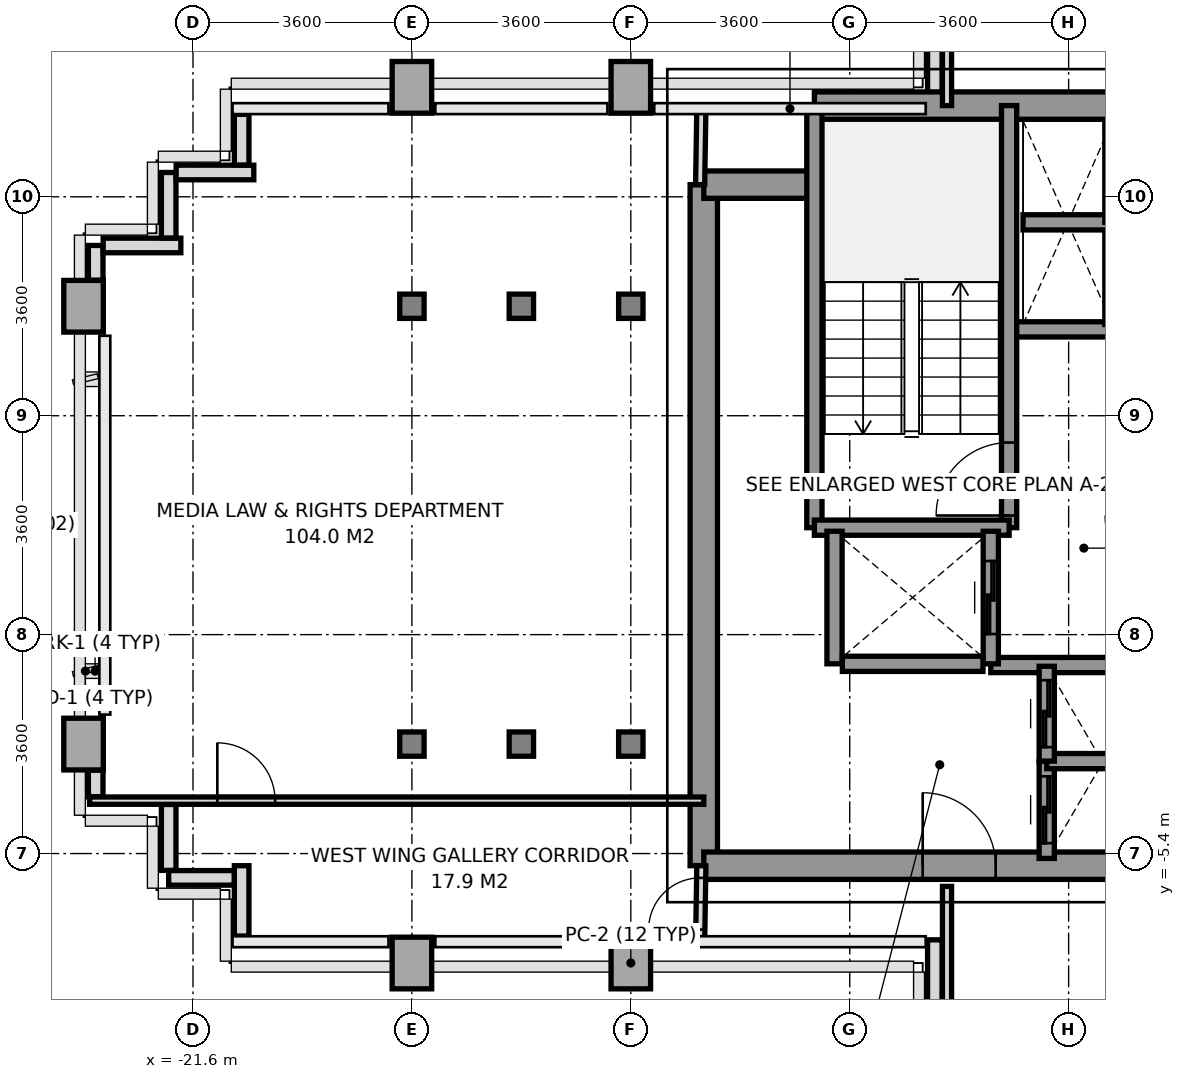
"""IFC4 building model, lengths in metres.
Left out: names, types, materials, properties, quantities, classifications, styles, units other than length and angle.
Written with IfcOpenShell. Run it as: python <this file> out.ifc"""

import sys

from ifc_helpers import new_model, si_unit, direction, frame, frame_2d, origin, origin_2d, place, context, subcontext, project, spatial, rectangle, i_section, extrude, source, transform, mapped, element, fill, save


model = new_model("IFC4")
c1 = context("Model", 3, precision=1e-05, world=origin(), true_north=direction((0.0, 1.0)))
c2 = subcontext(c1, "Body", "Model", "MODEL_VIEW")
j1 = project(units=[si_unit("LENGTHUNIT", "METRE"), si_unit("PLANEANGLEUNIT", "RADIAN")], contexts=[c1])
p1 = place(None, origin())
s1 = spatial("IfcSite", under=j1, at=p1, CompositionType="ELEMENT")
p2 = place(p1, origin())
s2 = spatial("IfcBuilding", under=s1, at=p2, CompositionType="ELEMENT")
p3 = place(p2, frame((0.0, 0.0, 134.6)))
s3 = spatial("IfcBuildingStorey", under=s2, at=p3, CompositionType="ELEMENT", Elevation=134.6)
m1 = source(origin(), c2, "Body", "SweptSolid", [
    extrude(rectangle(XDim=0.65, YDim=0.85, at=origin_2d()), origin(), (0.0, 0.0, 1.0), 3.2),
])
for number, where, z_axis, x_axis in (
    (1, (-23.4, -3.6, 0.0), (0.0, 0.0, 1.0), (1.0, 0.0, 0.0)),
    (2, (-23.4, 3.6, 0.0), (0.0, 0.0, 1.0), (1.0, 0.0, 0.0)),
    (3, (-18.0, -7.2, 0.0), (0.0, 0.0, 1.0), (1.0, 0.0, 0.0)),
):
    element("IfcColumn", number, at=place(p3, frame(where, z_axis=z_axis, x_axis=x_axis)), inside=s3, PredefinedType="COLUMN", context=c2, shape_type="MappedRepresentation", body=[
        mapped(m1, transform((0.0, 0.0, 0.0), x_axis=(1.0, 0.0, 0.0), y_axis=(0.0, 1.0, 0.0), z_axis=(0.0, 0.0, 1.0), scale=1.0)),
    ])
m2 = source(origin(), c2, "Body", "SweptSolid", [
    extrude(i_section(OverallWidth=0.401, OverallDepth=0.399, WebThickness=0.02, FlangeThickness=0.032, at=origin_2d()), origin(), (0.0, 0.0, 1.0), 3.2),
])
for number, where, z_axis, x_axis in (
    (4, (-18.0, -3.6, 0.0), (0.0, 0.0, 1.0), (1.0, 0.0, 0.0)),
    (5, (-18.0, 3.6, 0.0), (0.0, 0.0, 1.0), (1.0, 0.0, 0.0)),
):
    element("IfcColumn", number, at=place(p3, frame(where, z_axis=z_axis, x_axis=x_axis)), inside=s3, PredefinedType="COLUMN", context=c2, shape_type="MappedRepresentation", body=[
        mapped(m2, transform((0.0, 0.0, 0.0), x_axis=(1.0, 0.0, 0.0), y_axis=(0.0, 1.0, 0.0), z_axis=(0.0, 0.0, 1.0), scale=1.0)),
    ])
p4 = place(p3, frame((-18.0, 7.2, 0.0), z_axis=(0.0, 0.0, 1.0), x_axis=(1.0, 0.0, 0.0)))
e6 = element("IfcColumn", 6, at=p4, inside=s3, PredefinedType="COLUMN", context=c2, shape_type="MappedRepresentation", body=[
    mapped(m1, transform((0.0, 0.0, 0.0), x_axis=(1.0, 0.0, 0.0), y_axis=(0.0, 1.0, 0.0), z_axis=(0.0, 0.0, 1.0), scale=1.0)),
])
for number, where, z_axis, x_axis in (
    (7, (-16.2, -3.6, 0.0), (0.0, 0.0, 1.0), (1.0, 0.0, 0.0)),
    (8, (-16.2, 3.6, 0.0), (0.0, 0.0, 1.0), (1.0, 0.0, 0.0)),
):
    element("IfcColumn", number, at=place(p3, frame(where, z_axis=z_axis, x_axis=x_axis)), inside=s3, PredefinedType="COLUMN", context=c2, shape_type="MappedRepresentation", body=[
        mapped(m2, transform((0.0, 0.0, 0.0), x_axis=(1.0, 0.0, 0.0), y_axis=(0.0, 1.0, 0.0), z_axis=(0.0, 0.0, 1.0), scale=1.0)),
    ])
p5 = place(p3, frame((-14.4, -7.2, 0.0), z_axis=(0.0, 0.0, 1.0), x_axis=(1.0, 0.0, 0.0)))
e9 = element("IfcColumn", 9, at=p5, inside=s3, PredefinedType="COLUMN", context=c2, shape_type="MappedRepresentation", body=[
    mapped(m1, transform((0.0, 0.0, 0.0), x_axis=(1.0, 0.0, 0.0), y_axis=(0.0, 1.0, 0.0), z_axis=(0.0, 0.0, 1.0), scale=1.0)),
])
for number, where, z_axis, x_axis in (
    (10, (-14.4, -3.6, 0.0), (0.0, 0.0, 1.0), (1.0, 0.0, 0.0)),
    (11, (-14.4, 3.6, 0.0), (0.0, 0.0, 1.0), (1.0, 0.0, 0.0)),
):
    element("IfcColumn", number, at=place(p3, frame(where, z_axis=z_axis, x_axis=x_axis)), inside=s3, PredefinedType="COLUMN", context=c2, shape_type="MappedRepresentation", body=[
        mapped(m2, transform((0.0, 0.0, 0.0), x_axis=(1.0, 0.0, 0.0), y_axis=(0.0, 1.0, 0.0), z_axis=(0.0, 0.0, 1.0), scale=1.0)),
    ])
p6 = place(p3, frame((-14.4, 7.2, 0.0), z_axis=(0.0, 0.0, 1.0), x_axis=(1.0, 0.0, 0.0)))
e12 = element("IfcColumn", 12, at=p6, inside=s3, PredefinedType="COLUMN", context=c2, shape_type="MappedRepresentation", body=[
    mapped(m1, transform((0.0, 0.0, 0.0), x_axis=(1.0, 0.0, 0.0), y_axis=(0.0, 1.0, 0.0), z_axis=(0.0, 0.0, 1.0), scale=1.0)),
])
p7 = place(p3, frame((-9.4, -8.472, 0.0), z_axis=(0.0, 0.0, 1.0), x_axis=(0.0, 1.0, 0.0)))
e13 = element("IfcWall", 13, at=p7, inside=s3, PredefinedType="PARAPET", context=c2, shape_type="SweptSolid", body=[
    extrude(rectangle(XDim=1.653, YDim=0.24, at=frame_2d((0.827, 0.0))), origin(), (0.0, 0.0, 1.0), 1.15),
])
p8 = place(p3, frame((-20.8, -6.757, 0.0), z_axis=(0.0, 0.0, 1.0), x_axis=(0.0, 1.0, 0.0)))
e14 = element("IfcWall", 14, at=p8, inside=s3, PredefinedType="PARAPET", context=c2, shape_type="SweptSolid", body=[
    extrude(rectangle(XDim=1.157, YDim=0.24, at=frame_2d((0.579, 0.0))), origin(), (0.0, 0.0, 1.0), 1.15),
])
p9 = place(p3, frame((-20.923, -5.8, 0.0), z_axis=(0.0, 0.0, 1.0), x_axis=(-1.0, 0.0, 0.0)))
e15 = element("IfcWall", 15, at=p9, inside=s3, PredefinedType="PARAPET", context=c2, shape_type="SweptSolid", body=[
    extrude(rectangle(XDim=1.077, YDim=0.24, at=frame_2d((0.539, 0.0))), origin(), (0.0, 0.0, 1.0), 1.15),
])
p10 = place(p3, frame((-22.0, -5.677, 0.0), z_axis=(0.0, 0.0, 1.0), x_axis=(0.0, 1.0, 0.0)))
e16 = element("IfcWall", 16, at=p10, inside=s3, PredefinedType="PARAPET", context=c2, shape_type="SweptSolid", body=[
    extrude(rectangle(XDim=1.084, YDim=0.24, at=frame_2d((0.542, 0.0))), origin(), (0.0, 0.0, 1.0), 1.15),
])
p11 = place(p3, frame((-23.2, -4.467, 0.0), z_axis=(0.0, 0.0, 1.0), x_axis=(0.0, 1.0, 0.0)))
e17 = element("IfcWall", 17, at=p11, inside=s3, PredefinedType="PARAPET", context=c2, shape_type="SweptSolid", body=[
    extrude(rectangle(XDim=0.439, YDim=0.24, at=frame_2d((0.219, 0.0))), origin(), (0.0, 0.0, 1.0), 1.15),
])
p12 = place(p3, frame((-23.2, 4.028, 0.0), z_axis=(0.0, 0.0, 1.0), x_axis=(0.0, 1.0, 0.0)))
e18 = element("IfcWall", 18, at=p12, inside=s3, PredefinedType="PARAPET", context=c2, shape_type="SweptSolid", body=[
    extrude(rectangle(XDim=0.572, YDim=0.24, at=frame_2d((0.286, 0.0))), origin(), (0.0, 0.0, 1.0), 1.15),
])
p13 = place(p3, frame((-23.077, 4.6, 0.0), z_axis=(0.0, 0.0, 1.0), x_axis=(1.0, 0.0, 0.0)))
e19 = element("IfcWall", 19, at=p13, inside=s3, PredefinedType="PARAPET", context=c2, shape_type="SweptSolid", body=[
    extrude(rectangle(XDim=1.277, YDim=0.24, at=frame_2d((0.638, 0.0))), origin(), (0.0, 0.0, 1.0), 1.15),
])
p14 = place(p3, frame((-22.0, 4.723, 0.0), z_axis=(0.0, 0.0, 1.0), x_axis=(0.0, 1.0, 0.0)))
e20 = element("IfcWall", 20, at=p14, inside=s3, PredefinedType="PARAPET", context=c2, shape_type="SweptSolid", body=[
    extrude(rectangle(XDim=1.077, YDim=0.24, at=frame_2d((0.539, 0.0))), origin(), (0.0, 0.0, 1.0), 1.15),
])
p15 = place(p3, frame((-21.877, 5.8, 0.0), z_axis=(0.0, 0.0, 1.0), x_axis=(1.0, 0.0, 0.0)))
e21 = element("IfcWall", 21, at=p15, inside=s3, PredefinedType="PARAPET", context=c2, shape_type="SweptSolid", body=[
    extrude(rectangle(XDim=1.277, YDim=0.24, at=frame_2d((0.638, 0.0))), origin(), (0.0, 0.0, 1.0), 1.15),
])
p16 = place(p3, frame((-20.8, 5.923, 0.0), z_axis=(0.0, 0.0, 1.0), x_axis=(0.0, 1.0, 0.0)))
e22 = element("IfcWall", 22, at=p16, inside=s3, PredefinedType="PARAPET", context=c2, shape_type="SweptSolid", body=[
    extrude(rectangle(XDim=0.834, YDim=0.24, at=frame_2d((0.417, 0.0))), origin(), (0.0, 0.0, 1.0), 1.15),
])
p17 = place(p3, frame((-9.4, 6.953, 0.0), z_axis=(0.0, 0.0, 1.0), x_axis=(0.0, 1.0, 0.0)))
e23 = element("IfcWall", 23, at=p17, inside=s3, PredefinedType="PARAPET", context=c2, shape_type="SweptSolid", body=[
    extrude(rectangle(XDim=1.519, YDim=0.24, at=frame_2d((0.76, 0.0))), origin(), (0.0, 0.0, 1.0), 1.15),
])
p18 = place(p3, frame((-13.2, -5.6, 0.0), z_axis=(0.0, 0.0, 1.0), x_axis=(0.0, 1.0, 0.0)))
e24 = element("IfcWall", 24, at=p18, inside=s3, PredefinedType="SHEAR", context=c2, shape_type="SweptSolid", body=[
    extrude(rectangle(XDim=11.2, YDim=0.45, at=frame_2d((5.6, 0.0))), origin(), (0.0, 0.0, 1.0), 3.2),
])
p19 = place(p3, frame((-11.381, 6.9, 0.0), z_axis=(0.0, 0.0, 1.0), x_axis=(1.0, 0.0, 0.0)))
e25 = element("IfcWall", 25, at=p19, inside=s3, PredefinedType="SHEAR", context=c2, shape_type="SweptSolid", body=[
    extrude(rectangle(XDim=5.981, YDim=0.45, at=frame_2d((2.991, 0.0))), origin(), (0.0, 0.0, 1.0), 3.2),
])
p20 = place(p3, frame((-13.2, 5.6, 0.0), z_axis=(0.0, 0.0, 1.0), x_axis=(1.0, 0.0, 0.0)))
e26 = element("IfcWall", 26, at=p20, inside=s3, PredefinedType="SHEAR", context=c2, shape_type="SweptSolid", body=[
    extrude(rectangle(XDim=1.819, YDim=0.45, at=frame_2d((0.909, 0.0))), origin(), (0.0, 0.0, 1.0), 3.2),
])
p21 = place(p3, frame((-13.2, -5.6, 0.0), z_axis=(0.0, 0.0, 1.0), x_axis=(1.0, 0.0, 0.0)))
e27 = element("IfcWall", 27, at=p21, inside=s3, PredefinedType="SHEAR", context=c2, shape_type="SweptSolid", body=[
    extrude(rectangle(XDim=7.8, YDim=0.45, at=frame_2d((3.9, 0.0))), origin(), (0.0, 0.0, 1.0), 3.2),
])
p22 = place(p21, frame((3.6, 0.0, 0.0)))
e28 = element("IfcOpeningElement", 28, at=p22, cuts=e27, PredefinedType="OPENING", context=c2, shape_type="SweptSolid", body=[
    extrude(rectangle(XDim=1.2, YDim=2.2, at=frame_2d((0.6, 1.1))), frame((0.0, 0.235, 0.0), z_axis=(0.0, -1.0, 0.0), x_axis=(1.0, 0.0, 0.0)), (0.0, 0.0, 1.0), 0.47),
])
p23 = place(p3, frame((-8.18, 3.22, 0.0), z_axis=(0.0, 0.0, 1.0), x_axis=(1.0, 0.0, 0.0)))
e29 = element("IfcWall", 29, at=p23, inside=s3, PredefinedType="SOLIDWALL", context=c2, shape_type="SweptSolid", body=[
    extrude(rectangle(XDim=2.78, YDim=0.25, at=frame_2d((1.39, 0.0))), origin(), (0.0, 0.0, 1.0), 3.2),
])
p24 = place(p3, frame((-8.48, -2.3, 0.0), z_axis=(0.0, 0.0, 1.0), x_axis=(1.0, 0.0, 0.0)))
e30 = element("IfcWall", 30, at=p24, inside=s3, PredefinedType="SOLIDWALL", context=c2, shape_type="SweptSolid", body=[
    extrude(rectangle(XDim=3.08, YDim=0.25, at=frame_2d((1.54, 0.0))), origin(), (0.0, 0.0, 1.0), 3.2),
])
p25 = place(p3, frame((-8.179, -0.041, 0.0), z_axis=(0.0, 0.0, 1.0), x_axis=(0.0, 1.0, 0.0)))
e31 = element("IfcWall", 31, at=p25, inside=s3, PredefinedType="SOLIDWALL", context=c2, shape_type="SweptSolid", body=[
    extrude(rectangle(XDim=6.941, YDim=0.25, at=frame_2d((3.47, 0.0))), origin(), (0.0, 0.0, 1.0), 3.2),
])
p26 = place(p25, frame((0.2, 0.0, 0.0)))
e32 = element("IfcOpeningElement", 32, at=p26, cuts=e31, PredefinedType="OPENING", context=c2, shape_type="SweptSolid", body=[
    extrude(rectangle(XDim=1.2, YDim=2.2, at=frame_2d((0.6, 1.1))), frame((0.0, 0.135, 0.0), z_axis=(0.0, -1.0, 0.0), x_axis=(1.0, 0.0, 0.0)), (0.0, 0.0, 1.0), 0.27),
])
p27 = place(p3, frame((-11.381, -0.041, 0.0), z_axis=(0.0, 0.0, 1.0), x_axis=(0.0, 1.0, 0.0)))
e33 = element("IfcWall", 33, at=p27, inside=s3, PredefinedType="SOLIDWALL", context=c2, shape_type="SweptSolid", body=[
    extrude(rectangle(XDim=6.941, YDim=0.25, at=frame_2d((3.47, 0.0))), origin(), (0.0, 0.0, 1.0), 3.2),
])
p28 = place(p3, frame((-11.381, -0.041, 0.0), z_axis=(0.0, 0.0, 1.0), x_axis=(1.0, 0.0, 0.0)))
e34 = element("IfcWall", 34, at=p28, inside=s3, PredefinedType="SOLIDWALL", context=c2, shape_type="SweptSolid", body=[
    extrude(rectangle(XDim=3.202, YDim=0.25, at=frame_2d((1.601, 0.0))), origin(), (0.0, 0.0, 1.0), 3.2),
])
p29 = place(p3, frame((-11.05, -2.28, 0.0), z_axis=(0.0, 0.0, 1.0), x_axis=(0.0, 1.0, 0.0)))
e35 = element("IfcWall", 35, at=p29, inside=s3, PredefinedType="SOLIDWALL", context=c2, shape_type="SweptSolid", body=[
    extrude(rectangle(XDim=2.18, YDim=0.25, at=frame_2d((1.09, 0.0))), origin(), (0.0, 0.0, 1.0), 3.2),
])
p30 = place(p3, frame((-8.48, -2.28, 0.0), z_axis=(0.0, 0.0, 1.0), x_axis=(0.0, 1.0, 0.0)))
e36 = element("IfcWall", 36, at=p30, inside=s3, PredefinedType="SOLIDWALL", context=c2, shape_type="SweptSolid", body=[
    extrude(rectangle(XDim=2.18, YDim=0.25, at=frame_2d((1.09, 0.0))), origin(), (0.0, 0.0, 1.0), 3.2),
])
p31 = place(p30, frame((0.49, 0.0, 0.0)))
e37 = element("IfcOpeningElement", 37, at=p31, cuts=e36, PredefinedType="OPENING", context=c2, shape_type="SweptSolid", body=[
    extrude(rectangle(XDim=1.2, YDim=2.2, at=frame_2d((0.6, 1.1))), frame((0.0, 0.135, 0.0), z_axis=(0.0, -1.0, 0.0), x_axis=(1.0, 0.0, 0.0)), (0.0, 0.0, 1.0), 0.27),
])
p32 = place(p3, frame((-10.921, -2.28, 0.0), z_axis=(0.0, 0.0, 1.0), x_axis=(1.0, 0.0, 0.0)))
e38 = element("IfcWall", 38, at=p32, inside=s3, PredefinedType="SOLIDWALL", context=c2, shape_type="SweptSolid", body=[
    extrude(rectangle(XDim=2.312, YDim=0.25, at=frame_2d((1.156, 0.0))), origin(), (0.0, 0.0, 1.0), 3.2),
])
p33 = place(p3, frame((-7.56, -5.48, 0.0), z_axis=(0.0, 0.0, 1.0), x_axis=(0.0, 1.0, 0.0)))
e39 = element("IfcWall", 39, at=p33, inside=s3, PredefinedType="SOLIDWALL", context=c2, shape_type="SweptSolid", body=[
    extrude(rectangle(XDim=1.6, YDim=0.25, at=frame_2d((0.8, 0.0))), origin(), (0.0, 0.0, 1.0), 3.2),
])
p34 = place(p33, frame((0.25, 0.0, 0.0)))
e40 = element("IfcOpeningElement", 40, at=p34, cuts=e39, PredefinedType="OPENING", context=c2, shape_type="SweptSolid", body=[
    extrude(rectangle(XDim=1.1, YDim=2.2, at=frame_2d((0.55, 1.1))), frame((0.0, 0.135, 0.0), z_axis=(0.0, -1.0, 0.0), x_axis=(1.0, 0.0, 0.0)), (0.0, 0.0, 1.0), 0.27),
])
p35 = place(p3, frame((-7.56, -3.88, 0.0), z_axis=(0.0, 0.0, 1.0), x_axis=(1.0, 0.0, 0.0)))
e41 = element("IfcWall", 41, at=p35, inside=s3, PredefinedType="SOLIDWALL", context=c2, shape_type="SweptSolid", body=[
    extrude(rectangle(XDim=1.84, YDim=0.25, at=frame_2d((0.92, 0.0))), origin(), (0.0, 0.0, 1.0), 3.2),
])
p36 = place(p3, frame((-7.56, -3.88, 0.0), z_axis=(0.0, 0.0, 1.0), x_axis=(0.0, 1.0, 0.0)))
e42 = element("IfcWall", 42, at=p36, inside=s3, PredefinedType="SOLIDWALL", context=c2, shape_type="SweptSolid", body=[
    extrude(rectangle(XDim=1.56, YDim=0.25, at=frame_2d((0.78, 0.0))), origin(), (0.0, 0.0, 1.0), 3.2),
])
p37 = place(p36, frame((0.23, 0.0, 0.0)))
e43 = element("IfcOpeningElement", 43, at=p37, cuts=e42, PredefinedType="OPENING", context=c2, shape_type="SweptSolid", body=[
    extrude(rectangle(XDim=1.1, YDim=2.2, at=frame_2d((0.55, 1.1))), frame((0.0, 0.135, 0.0), z_axis=(0.0, -1.0, 0.0), x_axis=(1.0, 0.0, 0.0)), (0.0, 0.0, 1.0), 0.27),
])
p38 = place(p3, frame((-6.48, 3.3, 0.0), z_axis=(0.0, 0.0, 1.0), x_axis=(0.0, 1.0, 0.0)))
e44 = element("IfcWall", 44, at=p38, inside=s3, PredefinedType="SOLIDWALL", context=c2, shape_type="SweptSolid", body=[
    extrude(rectangle(XDim=1.68, YDim=0.25, at=frame_2d((0.84, 0.0))), origin(), (0.0, 0.0, 1.0), 3.2),
])
p39 = place(p3, frame((-7.95, 4.98, 0.0), z_axis=(0.0, 0.0, 1.0), x_axis=(1.0, 0.0, 0.0)))
e45 = element("IfcWall", 45, at=p39, inside=s3, PredefinedType="SOLIDWALL", context=c2, shape_type="SweptSolid", body=[
    extrude(rectangle(XDim=1.47, YDim=0.25, at=frame_2d((0.735, 0.0))), origin(), (0.0, 0.0, 1.0), 3.2),
])
p40 = place(p3, frame((-6.48, 4.98, 0.0), z_axis=(0.0, 0.0, 1.0), x_axis=(0.0, 1.0, 0.0)))
e46 = element("IfcWall", 46, at=p40, inside=s3, PredefinedType="SOLIDWALL", context=c2, shape_type="SweptSolid", body=[
    extrude(rectangle(XDim=1.67, YDim=0.25, at=frame_2d((0.835, 0.0))), origin(), (0.0, 0.0, 1.0), 3.2),
])
p41 = place(p3, frame((-9.2, 6.9, 0.0), z_axis=(0.0, 0.0, 1.0), x_axis=(0.0, 1.0, 0.0)))
e47 = element("IfcWall", 47, at=p41, inside=s3, PredefinedType="PARTITIONING", context=c2, shape_type="SweptSolid", body=[
    extrude(rectangle(XDim=8.78, YDim=0.15, at=frame_2d((4.39, 0.0))), origin(), (0.0, 0.0, 1.0), 2.7),
])
p42 = place(p3, frame((-9.2, -15.68, 0.0), z_axis=(0.0, 0.0, 1.0), x_axis=(0.0, 1.0, 0.0)))
e48 = element("IfcWall", 48, at=p42, inside=s3, PredefinedType="PARTITIONING", context=c2, shape_type="SweptSolid", body=[
    extrude(rectangle(XDim=9.74, YDim=0.15, at=frame_2d((4.87, 0.0))), origin(), (0.0, 0.0, 1.0), 2.7),
])
p43 = place(p3, frame((-13.26, 5.6, 0.0), z_axis=(0.0, 0.0, 1.0), x_axis=(0.016013571389, 0.999871774545, 0.0)))
e49 = element("IfcWall", 49, at=p43, inside=s3, PredefinedType="PARTITIONING", context=c2, shape_type="SweptSolid", body=[
    extrude(rectangle(XDim=1.25, YDim=0.15, at=frame_2d((0.625, 0.0))), origin(), (0.0, 0.0, 1.0), 3.2),
])
p44 = place(p3, frame((-13.26, -6.85, 0.0), z_axis=(0.0, 0.0, 1.0), x_axis=(0.016013571389, 0.999871774545, 0.0)))
e50 = element("IfcWall", 50, at=p44, inside=s3, PredefinedType="PARTITIONING", context=c2, shape_type="SweptSolid", body=[
    extrude(rectangle(XDim=1.25, YDim=0.15, at=frame_2d((0.625, 0.0))), origin(), (0.0, 0.0, 1.0), 3.2),
])
p45 = place(p44, frame((0.2, 0.0, 0.0)))
e51 = element("IfcOpeningElement", 51, at=p45, cuts=e50, PredefinedType="OPENING", context=c2, shape_type="SweptSolid", body=[
    extrude(rectangle(XDim=0.85, YDim=2.1, at=frame_2d((0.425, 1.05))), frame((0.0, 0.085, 0.0), z_axis=(0.0, -1.0, 0.0), x_axis=(1.0, 0.0, 0.0)), (0.0, 0.0, 1.0), 0.17),
])
p46 = place(p3, frame((-23.3, -4.53, 0.0), z_axis=(0.0, 0.0, 1.0), x_axis=(1.0, 0.0, 0.0)))
e52 = element("IfcWall", 52, at=p46, inside=s3, PredefinedType="PARTITIONING", context=c2, shape_type="SweptSolid", body=[
    extrude(rectangle(XDim=10.1, YDim=0.12, at=frame_2d((5.05, 0.0))), origin(), (0.0, 0.0, 1.0), 2.75),
])
p47 = place(p46, frame((2.1, 0.0, 0.0)))
e53 = element("IfcOpeningElement", 53, at=p47, cuts=e52, PredefinedType="OPENING", context=c2, shape_type="SweptSolid", body=[
    extrude(rectangle(XDim=0.95, YDim=2.15, at=frame_2d((0.475, 1.075))), frame((0.0, 0.07, 0.0), z_axis=(0.0, -1.0, 0.0), x_axis=(1.0, 0.0, 0.0)), (0.0, 0.0, 1.0), 0.14),
])
m3 = source(origin(), c2, "Body", "SweptSolid", [
    extrude(rectangle(XDim=1.2, YDim=2.2, at=frame_2d((0.6, 1.1))), frame((0.0, 0.025, 0.0), z_axis=(0.0, -1.0, 0.0), x_axis=(1.0, 0.0, 0.0)), (0.0, 0.0, 1.0), 0.05),
])
p48 = place(p26, origin())
e54 = element("IfcDoor", 54, at=p48, inside=s3, OperationType="SINGLE_SWING_LEFT", PredefinedType="DOOR", context=c2, shape_type="MappedRepresentation", body=[
    mapped(m3, transform((0.0, 0.0, 0.0), x_axis=(1.0, 0.0, 0.0), y_axis=(0.0, 1.0, 0.0), z_axis=(0.0, 0.0, 1.0), scale=1.0)),
])
fill(e32, e54)
p49 = place(p22, origin())
e55 = element("IfcDoor", 55, at=p49, inside=s3, OperationType="SINGLE_SWING_LEFT", PredefinedType="DOOR", context=c2, shape_type="MappedRepresentation", body=[
    mapped(m3, transform((0.0, 0.0, 0.0), x_axis=(1.0, 0.0, 0.0), y_axis=(0.0, 1.0, 0.0), z_axis=(0.0, 0.0, 1.0), scale=1.0)),
])
fill(e28, e55)
p50 = place(p31, origin())
e56 = element("IfcDoor", 56, at=p50, inside=s3, OperationType="SLIDING_TO_RIGHT", PredefinedType="DOOR", context=c2, shape_type="MappedRepresentation", body=[
    mapped(m3, transform((0.0, 0.0, 0.0), x_axis=(1.0, 0.0, 0.0), y_axis=(0.0, 1.0, 0.0), z_axis=(0.0, 0.0, 1.0), scale=1.0)),
])
fill(e37, e56)
m4 = source(origin(), c2, "Body", "SweptSolid", [
    extrude(rectangle(XDim=1.1, YDim=2.2, at=frame_2d((0.55, 1.1))), frame((0.0, 0.025, 0.0), z_axis=(0.0, -1.0, 0.0), x_axis=(1.0, 0.0, 0.0)), (0.0, 0.0, 1.0), 0.05),
])
p51 = place(p34, origin())
e57 = element("IfcDoor", 57, at=p51, inside=s3, OperationType="SLIDING_TO_LEFT", PredefinedType="DOOR", context=c2, shape_type="MappedRepresentation", body=[
    mapped(m4, transform((0.0, 0.0, 0.0), x_axis=(1.0, 0.0, 0.0), y_axis=(0.0, 1.0, 0.0), z_axis=(0.0, 0.0, 1.0), scale=1.0)),
])
fill(e40, e57)
p52 = place(p37, origin())
e58 = element("IfcDoor", 58, at=p52, inside=s3, OperationType="SLIDING_TO_LEFT", PredefinedType="DOOR", context=c2, shape_type="MappedRepresentation", body=[
    mapped(m4, transform((0.0, 0.0, 0.0), x_axis=(1.0, 0.0, 0.0), y_axis=(0.0, 1.0, 0.0), z_axis=(0.0, 0.0, 1.0), scale=1.0)),
])
fill(e43, e58)
m5 = source(origin(), c2, "Body", "SweptSolid", [
    extrude(rectangle(XDim=0.85, YDim=2.1, at=frame_2d((0.425, 1.05))), frame((0.0, 0.025, 0.0), z_axis=(0.0, -1.0, 0.0), x_axis=(1.0, 0.0, 0.0)), (0.0, 0.0, 1.0), 0.05),
])
p53 = place(p45, origin())
e59 = element("IfcDoor", 59, at=p53, inside=s3, OperationType="SINGLE_SWING_LEFT", PredefinedType="DOOR", context=c2, shape_type="MappedRepresentation", body=[
    mapped(m5, transform((0.0, 0.0, 0.0), x_axis=(1.0, 0.0, 0.0), y_axis=(0.0, 1.0, 0.0), z_axis=(0.0, 0.0, 1.0), scale=1.0)),
])
fill(e51, e59)
m6 = source(origin(), c2, "Body", "SweptSolid", [
    extrude(rectangle(XDim=0.95, YDim=2.15, at=frame_2d((0.475, 1.075))), frame((0.0, 0.025, 0.0), z_axis=(0.0, -1.0, 0.0), x_axis=(1.0, 0.0, 0.0)), (0.0, 0.0, 1.0), 0.05),
])
p54 = place(p47, origin())
e60 = element("IfcDoor", 60, at=p54, inside=s3, OperationType="SINGLE_SWING_LEFT", PredefinedType="DOOR", context=c2, shape_type="MappedRepresentation", body=[
    mapped(m6, transform((0.0, 0.0, 0.0), x_axis=(1.0, 0.0, 0.0), y_axis=(0.0, 1.0, 0.0), z_axis=(0.0, 0.0, 1.0), scale=1.0)),
])
fill(e53, e60)
save(model, sys.argv[1])
